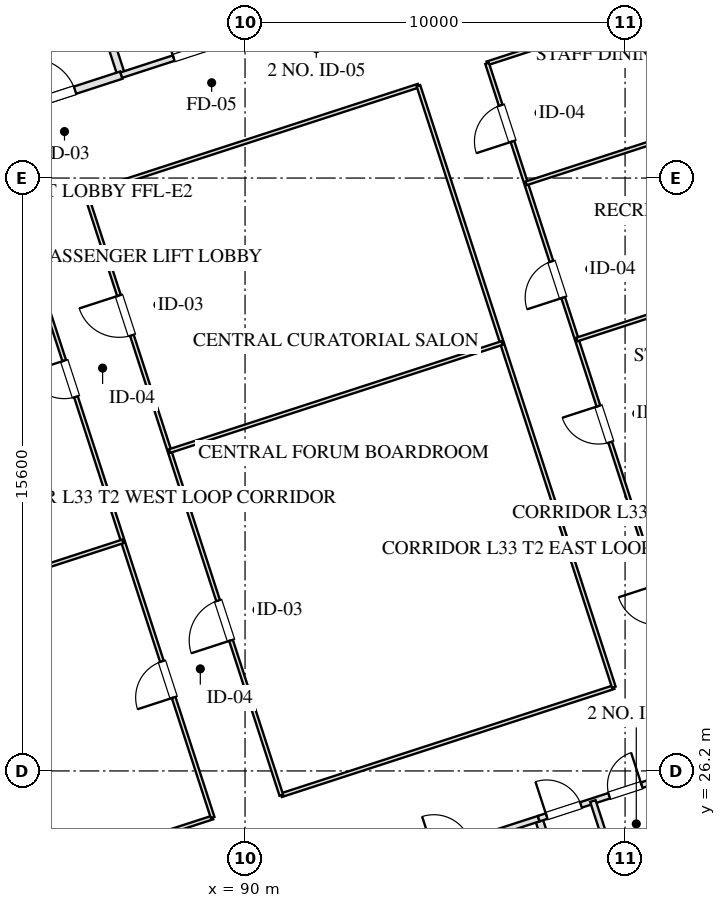
"""IFC4 building model, lengths in metres.
Left out: names, types, materials, properties, quantities, classifications, styles, units other than length and angle.
Written with IfcOpenShell. Run it as: python <this file> out.ifc"""

import sys

from ifc_helpers import new_model, si_unit, direction, frame, frame_2d, origin, place, context, subcontext, project, spatial, rectangle, extrude, element, fill, save


model = new_model("IFC4")
c1 = context("Model", 3, precision=1e-05, world=origin(), true_north=direction((0.0, 1.0)))
c2 = subcontext(c1, "Body", "Model", "MODEL_VIEW")
j1 = project(units=[si_unit("LENGTHUNIT", "METRE"), si_unit("PLANEANGLEUNIT", "RADIAN")], contexts=[c1])
p1 = place(None, origin())
s1 = spatial("IfcSite", under=j1, at=p1, CompositionType="ELEMENT")
p2 = place(p1, origin())
s2 = spatial("IfcBuilding", under=s1, at=p2, CompositionType="ELEMENT")
p3 = place(p2, frame((0.0, 0.0, 127.65)))
s3 = spatial("IfcBuildingStorey", under=s2, at=p3, CompositionType="ELEMENT", Elevation=127.65)
p4 = place(p3, frame((99.284, 61.41, 0.0), z_axis=(0.0, 0.0, 1.0), x_axis=(0.309017542002, -0.95105633836, 0.0)))
e1 = element("IfcWall", 1, at=p4, inside=s3, PredefinedType="SOLIDWALL", context=c2, shape_type="SweptSolid", body=[
    extrude(rectangle(XDim=46.4, YDim=0.4, at=frame_2d((23.2, 0.0))), origin(), (0.0, 0.0, 1.0), 2.61),
])
p5 = place(p3, frame((97.727, 24.944, 0.0), z_axis=(0.0, 0.0, 1.0), x_axis=(0.309016001439, -0.951056838919, 0.0)))
e2 = element("IfcWall", 2, at=p5, inside=s3, PredefinedType="PARTITIONING", context=c2, shape_type="SweptSolid", body=[
    extrude(rectangle(XDim=8.43, YDim=0.2, at=frame_2d((4.215, 0.0))), origin(), (0.0, 0.0, 1.0), 3.175),
])
p6 = place(p3, frame((93.542, 23.585, 0.0), z_axis=(0.0, 0.0, 1.0), x_axis=(0.951063829732, 0.308994485023, 0.0)))
e3 = element("IfcWall", 3, at=p6, inside=s3, PredefinedType="PARTITIONING", context=c2, shape_type="SweptSolid", body=[
    extrude(rectangle(XDim=4.4, YDim=0.15, at=frame_2d((2.2, 0.0))), origin(), (0.0, 0.0, 1.0), 3.175),
])
p7 = place(p6, frame((1.5, 0.0, 0.0)))
e4 = element("IfcOpeningElement", 4, at=p7, cuts=e3, PredefinedType="OPENING", context=c2, shape_type="SweptSolid", body=[
    extrude(rectangle(XDim=1.0, YDim=2.05, at=frame_2d((0.5, 1.025))), frame((0.0, 0.085, 0.0), z_axis=(0.0, -1.0, 0.0), x_axis=(1.0, 0.0, 0.0)), (0.0, 0.0, 1.0), 0.17),
])
p8 = place(p3, frame((97.727, 24.944, 0.0), z_axis=(0.0, 0.0, 1.0), x_axis=(0.951036872128, 0.309077446369, 0.0)))
e5 = element("IfcWall", 5, at=p8, inside=s3, PredefinedType="PARTITIONING", context=c2, shape_type="SweptSolid", body=[
    extrude(rectangle(XDim=3.2, YDim=0.15, at=frame_2d((1.6, 0.0))), origin(), (0.0, 0.0, 1.0), 3.175),
])
p9 = place(p8, frame((0.22, 0.0, 0.0)))
e6 = element("IfcOpeningElement", 6, at=p9, cuts=e5, PredefinedType="OPENING", context=c2, shape_type="SweptSolid", body=[
    extrude(rectangle(XDim=0.95, YDim=2.05, at=frame_2d((0.475, 1.025))), frame((0.0, 0.085, 0.0), z_axis=(0.0, -1.0, 0.0), x_axis=(1.0, 0.0, 0.0)), (0.0, 0.0, 1.0), 0.17),
])
p10 = place(p8, frame((1.95, 0.0, 0.0)))
e7 = element("IfcOpeningElement", 7, at=p10, cuts=e5, PredefinedType="OPENING", context=c2, shape_type="SweptSolid", body=[
    extrude(rectangle(XDim=0.9, YDim=2.05, at=frame_2d((0.45, 1.025))), frame((0.0, 0.085, 0.0), z_axis=(0.0, -1.0, 0.0), x_axis=(1.0, 0.0, 0.0)), (0.0, 0.0, 1.0), 0.17),
])
p11 = place(p3, frame((99.153, 25.408, 0.0), z_axis=(0.0, 0.0, 1.0), x_axis=(0.309016001439, -0.951056838919, 0.0)))
e8 = element("IfcWall", 8, at=p11, inside=s3, PredefinedType="PARTITIONING", context=c2, shape_type="SweptSolid", body=[
    extrude(rectangle(XDim=8.43, YDim=0.15, at=frame_2d((4.215, 0.0))), origin(), (0.0, 0.0, 1.0), 3.175),
])
p12 = place(p11, frame((2.55, 0.0, 0.0)))
e9 = element("IfcOpeningElement", 9, at=p12, cuts=e8, PredefinedType="OPENING", context=c2, shape_type="SweptSolid", body=[
    extrude(rectangle(XDim=0.95, YDim=2.05, at=frame_2d((0.475, 1.025))), frame((0.0, 0.085, 0.0), z_axis=(0.0, -1.0, 0.0), x_axis=(1.0, 0.0, 0.0)), (0.0, 0.0, 1.0), 0.17),
])
p13 = place(p11, frame((5.6, 0.0, 0.0)))
e10 = element("IfcOpeningElement", 10, at=p13, cuts=e8, PredefinedType="OPENING", context=c2, shape_type="SweptSolid", body=[
    extrude(rectangle(XDim=0.9, YDim=2.05, at=frame_2d((0.45, 1.025))), frame((0.0, 0.085, 0.0), z_axis=(0.0, -1.0, 0.0), x_axis=(1.0, 0.0, 0.0)), (0.0, 0.0, 1.0), 0.17),
])
p14 = place(p3, frame((86.743, 44.508, 0.0), z_axis=(0.0, 0.0, 1.0), x_axis=(-0.309016001439, 0.951056838919, 0.0)))
e11 = element("IfcWall", 11, at=p14, inside=s3, PredefinedType="PARTITIONING", context=c2, shape_type="SweptSolid", body=[
    extrude(rectangle(XDim=8.43, YDim=0.2, at=frame_2d((4.215, 0.0))), origin(), (0.0, 0.0, 1.0), 3.175),
])
p15 = place(p3, frame((83.101, 43.324, 0.0), z_axis=(0.0, 0.0, 1.0), x_axis=(0.951052804469, 0.309028417967, 0.0)))
e12 = element("IfcWall", 12, at=p15, inside=s3, PredefinedType="PARTITIONING", context=c2, shape_type="SweptSolid", body=[
    extrude(rectangle(XDim=3.83, YDim=0.2, at=frame_2d((1.915, 0.0))), origin(), (0.0, 0.0, 1.0), 3.175),
])
p16 = place(p15, frame((1.35, 0.0, 0.0)))
e13 = element("IfcOpeningElement", 13, at=p16, cuts=e12, PredefinedType="OPENING", context=c2, shape_type="SweptSolid", body=[
    extrude(rectangle(XDim=1.2, YDim=2.05, at=frame_2d((0.6, 1.025))), frame((0.0, 0.11, 0.0), z_axis=(0.0, -1.0, 0.0), x_axis=(1.0, 0.0, 0.0)), (0.0, 0.0, 1.0), 0.22),
])
p17 = place(p3, frame((86.743, 44.508, 0.0), z_axis=(0.0, 0.0, 1.0), x_axis=(0.951063829732, 0.308994485023, 0.0)))
e14 = element("IfcWall", 14, at=p17, inside=s3, PredefinedType="PARTITIONING", context=c2, shape_type="SweptSolid", body=[
    extrude(rectangle(XDim=4.4, YDim=0.15, at=frame_2d((2.2, 0.0))), origin(), (0.0, 0.0, 1.0), 3.175),
])
p18 = place(p17, frame((1.45, 0.0, 0.0)))
e15 = element("IfcOpeningElement", 15, at=p18, cuts=e14, PredefinedType="OPENING", context=c2, shape_type="SweptSolid", body=[
    extrude(rectangle(XDim=1.5, YDim=2.05, at=frame_2d((0.75, 1.025))), frame((0.0, 0.085, 0.0), z_axis=(0.0, -1.0, 0.0), x_axis=(1.0, 0.0, 0.0)), (0.0, 0.0, 1.0), 0.17),
])
p19 = place(p3, frame((76.308, 20.803, 0.0), z_axis=(0.0, 0.0, 1.0), x_axis=(0.951054001411, 0.309024734286, 0.0)))
e16 = element("IfcWall", 16, at=p19, inside=s3, PredefinedType="MOVABLE", context=c2, shape_type="SweptSolid", body=[
    extrude(rectangle(XDim=13.5, YDim=0.1, at=frame_2d((6.75, 0.0))), origin(), (0.0, 0.0, 1.0), 3.175),
])
p20 = place(p3, frame((90.954, 25.562, 0.0), z_axis=(0.0, 0.0, 1.0), x_axis=(0.951052398814, 0.309029666393, 0.0)))
e17 = element("IfcWall", 17, at=p20, inside=s3, PredefinedType="MOVABLE", context=c2, shape_type="SweptSolid", body=[
    extrude(rectangle(XDim=9.2, YDim=0.1, at=frame_2d((4.6, 0.0))), origin(), (0.0, 0.0, 1.0), 3.175),
])
p21 = place(p3, frame((85.812, 41.387, 0.0), z_axis=(0.0, 0.0, 1.0), x_axis=(0.951054933035, 0.309021867106, 0.0)))
e18 = element("IfcWall", 18, at=p21, inside=s3, PredefinedType="MOVABLE", context=c2, shape_type="SweptSolid", body=[
    extrude(rectangle(XDim=9.2, YDim=0.1, at=frame_2d((4.6, 0.0))), origin(), (0.0, 0.0, 1.0), 3.175),
])
p22 = place(p3, frame((96.369, 44.818, 0.0), z_axis=(0.0, 0.0, 1.0), x_axis=(0.9510592298, 0.30900864294, 0.0)))
e19 = element("IfcWall", 19, at=p22, inside=s3, PredefinedType="MOVABLE", context=c2, shape_type="SweptSolid", body=[
    extrude(rectangle(XDim=7.7, YDim=0.1, at=frame_2d((3.85, 0.0))), origin(), (0.0, 0.0, 1.0), 3.175),
])
p23 = place(p3, frame((89.147, 24.975, 0.0), z_axis=(0.0, 0.0, 1.0), x_axis=(-0.309022042254, 0.951054876125, 0.0)))
e20 = element("IfcWall", 20, at=p23, inside=s3, PredefinedType="MOVABLE", context=c2, shape_type="SweptSolid", body=[
    extrude(rectangle(XDim=16.64, YDim=0.1, at=frame_2d((8.32, 0.0))), origin(), (0.0, 0.0, 1.0), 3.175),
])
p24 = place(p23, frame((3.32, 0.0, 0.0)))
e21 = element("IfcOpeningElement", 21, at=p24, cuts=e20, PredefinedType="OPENING", context=c2, shape_type="SweptSolid", body=[
    extrude(rectangle(XDim=1.0, YDim=2.05, at=frame_2d((0.5, 1.025))), frame((0.0, 0.06, 0.0), z_axis=(0.0, -1.0, 0.0), x_axis=(1.0, 0.0, 0.0)), (0.0, 0.0, 1.0), 0.12),
])
p25 = place(p23, frame((11.64, 0.0, 0.0)))
e22 = element("IfcOpeningElement", 22, at=p25, cuts=e20, PredefinedType="OPENING", context=c2, shape_type="SweptSolid", body=[
    extrude(rectangle(XDim=1.0, YDim=2.05, at=frame_2d((0.5, 1.025))), frame((0.0, 0.06, 0.0), z_axis=(0.0, -1.0, 0.0), x_axis=(1.0, 0.0, 0.0)), (0.0, 0.0, 1.0), 0.12),
])
p26 = place(p3, frame((90.954, 25.562, 0.0), z_axis=(0.0, 0.0, 1.0), x_axis=(-0.30901773025, 0.951056277195, 0.0)))
e23 = element("IfcWall", 23, at=p26, inside=s3, PredefinedType="MOVABLE", context=c2, shape_type="SweptSolid", body=[
    extrude(rectangle(XDim=16.64, YDim=0.1, at=frame_2d((8.32, 0.0))), origin(), (0.0, 0.0, 1.0), 3.175),
])
p27 = place(p26, frame((4.284, 0.0, 0.0)))
e24 = element("IfcOpeningElement", 24, at=p27, cuts=e23, PredefinedType="OPENING", context=c2, shape_type="SweptSolid", body=[
    extrude(rectangle(XDim=1.1, YDim=2.05, at=frame_2d((0.55, 1.025))), frame((0.0, 0.06, 0.0), z_axis=(0.0, -1.0, 0.0), x_axis=(1.0, 0.0, 0.0)), (0.0, 0.0, 1.0), 0.12),
])
p28 = place(p26, frame((12.724, 0.0, 0.0)))
e25 = element("IfcOpeningElement", 25, at=p28, cuts=e23, PredefinedType="OPENING", context=c2, shape_type="SweptSolid", body=[
    extrude(rectangle(XDim=1.1, YDim=2.05, at=frame_2d((0.55, 1.025))), frame((0.0, 0.06, 0.0), z_axis=(0.0, -1.0, 0.0), x_axis=(1.0, 0.0, 0.0)), (0.0, 0.0, 1.0), 0.12),
])
p29 = place(p3, frame((99.704, 28.405, 0.0), z_axis=(0.0, 0.0, 1.0), x_axis=(-0.309004459387, 0.951060589068, 0.0)))
e26 = element("IfcWall", 26, at=p29, inside=s3, PredefinedType="MOVABLE", context=c2, shape_type="SweptSolid", body=[
    extrude(rectangle(XDim=16.64, YDim=0.1, at=frame_2d((8.32, 0.0))), origin(), (0.0, 0.0, 1.0), 3.175),
])
p30 = place(p3, frame((101.511, 28.992, 0.0), z_axis=(0.0, 0.0, 1.0), x_axis=(-0.30901773025, 0.951056277195, 0.0)))
e27 = element("IfcWall", 27, at=p30, inside=s3, PredefinedType="MOVABLE", context=c2, shape_type="SweptSolid", body=[
    extrude(rectangle(XDim=16.64, YDim=0.1, at=frame_2d((8.32, 0.0))), origin(), (0.0, 0.0, 1.0), 3.175),
])
p31 = place(p30, frame((1.16, 0.0, 0.0)))
e28 = element("IfcOpeningElement", 28, at=p31, cuts=e27, PredefinedType="OPENING", context=c2, shape_type="SweptSolid", body=[
    extrude(rectangle(XDim=1.05, YDim=2.05, at=frame_2d((0.525, 1.025))), frame((0.0, 0.06, 0.0), z_axis=(0.0, -1.0, 0.0), x_axis=(1.0, 0.0, 0.0)), (0.0, 0.0, 1.0), 0.12),
])
p32 = place(p30, frame((6.16, 0.0, 0.0)))
e29 = element("IfcOpeningElement", 29, at=p32, cuts=e27, PredefinedType="OPENING", context=c2, shape_type="SweptSolid", body=[
    extrude(rectangle(XDim=1.0, YDim=2.05, at=frame_2d((0.5, 1.025))), frame((0.0, 0.06, 0.0), z_axis=(0.0, -1.0, 0.0), x_axis=(1.0, 0.0, 0.0)), (0.0, 0.0, 1.0), 0.12),
])
p33 = place(p30, frame((10.16, 0.0, 0.0)))
e30 = element("IfcOpeningElement", 30, at=p33, cuts=e27, PredefinedType="OPENING", context=c2, shape_type="SweptSolid", body=[
    extrude(rectangle(XDim=1.0, YDim=2.05, at=frame_2d((0.5, 1.025))), frame((0.0, 0.06, 0.0), z_axis=(0.0, -1.0, 0.0), x_axis=(1.0, 0.0, 0.0)), (0.0, 0.0, 1.0), 0.12),
])
p34 = place(p30, frame((14.48, 0.0, 0.0)))
e31 = element("IfcOpeningElement", 31, at=p34, cuts=e27, PredefinedType="OPENING", context=c2, shape_type="SweptSolid", body=[
    extrude(rectangle(XDim=1.0, YDim=2.05, at=frame_2d((0.5, 1.025))), frame((0.0, 0.06, 0.0), z_axis=(0.0, -1.0, 0.0), x_axis=(1.0, 0.0, 0.0)), (0.0, 0.0, 1.0), 0.12),
])
p35 = place(p3, frame((88.012, 34.616, 0.0), z_axis=(0.0, 0.0, 1.0), x_axis=(0.951054933035, 0.309021867106, 0.0)))
e32 = element("IfcWall", 32, at=p35, inside=s3, PredefinedType="MOVABLE", context=c2, shape_type="SweptSolid", body=[
    extrude(rectangle(XDim=9.2, YDim=0.1, at=frame_2d((4.6, 0.0))), origin(), (0.0, 0.0, 1.0), 3.175),
])
p36 = place(p3, frame((73.947, 28.069, 0.0), z_axis=(0.0, 0.0, 1.0), x_axis=(0.951059316265, 0.309008376821, 0.0)))
e33 = element("IfcWall", 33, at=p36, inside=s3, PredefinedType="MOVABLE", context=c2, shape_type="SweptSolid", body=[
    extrude(rectangle(XDim=13.5, YDim=0.1, at=frame_2d((6.75, 0.0))), origin(), (0.0, 0.0, 1.0), 3.175),
])
p37 = place(p3, frame((100.176, 33.101, 0.0), z_axis=(0.0, 0.0, 1.0), x_axis=(0.951056202154, 0.3090179612, 0.0)))
e34 = element("IfcWall", 34, at=p37, inside=s3, PredefinedType="MOVABLE", context=c2, shape_type="SweptSolid", body=[
    extrude(rectangle(XDim=7.7, YDim=0.1, at=frame_2d((3.85, 0.0))), origin(), (0.0, 0.0, 1.0), 3.175),
])
for number, where, z_axis, x_axis in (
    (35, (98.73, 37.552, 0.0), (0.0, 0.0, 1.0), (0.951, 0.309, 0.0)),
    (36, (97.395, 41.66, 0.0), (0.0, 0.0, 1.0), (0.951, 0.309, 0.0)),
):
    element("IfcWall", number, at=place(p3, frame(where, z_axis=z_axis, x_axis=x_axis)), inside=s3, PredefinedType="MOVABLE", context=c2, shape_type="SweptSolid", body=[
        extrude(rectangle(XDim=7.7, YDim=0.1, at=frame_2d((3.85, 0.0))), origin(), (0.0, 0.0, 1.0), 3.175),
    ])
p38 = place(p9, origin())
e37 = element("IfcDoor", 37, at=p38, inside=s3, OperationType="SINGLE_SWING_LEFT", PredefinedType="DOOR", context=c2, shape_type="SweptSolid", body=[
    extrude(rectangle(XDim=0.95, YDim=2.05, at=frame_2d((0.475, 1.025))), frame((0.0, 0.025, 0.0), z_axis=(0.0, -1.0, 0.0), x_axis=(1.0, 0.0, 0.0)), (0.0, 0.0, 1.0), 0.05),
])
fill(e6, e37)
p39 = place(p10, origin())
e38 = element("IfcDoor", 38, at=p39, inside=s3, OperationType="SINGLE_SWING_RIGHT", PredefinedType="DOOR", context=c2, shape_type="SweptSolid", body=[
    extrude(rectangle(XDim=0.9, YDim=2.05, at=frame_2d((0.45, 1.025))), frame((0.0, 0.025, 0.0), z_axis=(0.0, -1.0, 0.0), x_axis=(1.0, 0.0, 0.0)), (0.0, 0.0, 1.0), 0.05),
])
fill(e7, e38)
p40 = place(p16, origin())
e39 = element("IfcDoor", 39, at=p40, inside=s3, OperationType="SINGLE_SWING_LEFT", PredefinedType="DOOR", context=c2, shape_type="SweptSolid", body=[
    extrude(rectangle(XDim=1.2, YDim=2.05, at=frame_2d((0.6, 1.025))), frame((0.0, 0.025, 0.0), z_axis=(0.0, -1.0, 0.0), x_axis=(1.0, 0.0, 0.0)), (0.0, 0.0, 1.0), 0.05),
])
fill(e13, e39)
p41 = place(p18, origin())
e40 = element("IfcDoor", 40, at=p41, inside=s3, OperationType="SINGLE_SWING_LEFT", PredefinedType="DOOR", context=c2, shape_type="SweptSolid", body=[
    extrude(rectangle(XDim=1.5, YDim=2.05, at=frame_2d((0.75, 1.025))), frame((0.0, 0.025, 0.0), z_axis=(0.0, -1.0, 0.0), x_axis=(1.0, 0.0, 0.0)), (0.0, 0.0, 1.0), 0.05),
])
fill(e15, e40)
p42 = place(p24, origin())
e41 = element("IfcDoor", 41, at=p42, inside=s3, OperationType="SINGLE_SWING_LEFT", PredefinedType="DOOR", context=c2, shape_type="SweptSolid", body=[
    extrude(rectangle(XDim=1.0, YDim=2.05, at=frame_2d((0.5, 1.025))), frame((0.0, 0.025, 0.0), z_axis=(0.0, -1.0, 0.0), x_axis=(1.0, 0.0, 0.0)), (0.0, 0.0, 1.0), 0.05),
])
fill(e21, e41)
p43 = place(p25, origin())
e42 = element("IfcDoor", 42, at=p43, inside=s3, OperationType="SINGLE_SWING_RIGHT", PredefinedType="DOOR", context=c2, shape_type="SweptSolid", body=[
    extrude(rectangle(XDim=1.0, YDim=2.05, at=frame_2d((0.5, 1.025))), frame((0.0, 0.025, 0.0), z_axis=(0.0, -1.0, 0.0), x_axis=(1.0, 0.0, 0.0)), (0.0, 0.0, 1.0), 0.05),
])
fill(e22, e42)
p44 = place(p27, origin())
e43 = element("IfcDoor", 43, at=p44, inside=s3, OperationType="SINGLE_SWING_LEFT", PredefinedType="DOOR", context=c2, shape_type="SweptSolid", body=[
    extrude(rectangle(XDim=1.1, YDim=2.05, at=frame_2d((0.55, 1.025))), frame((0.0, 0.025, 0.0), z_axis=(0.0, -1.0, 0.0), x_axis=(1.0, 0.0, 0.0)), (0.0, 0.0, 1.0), 0.05),
])
fill(e24, e43)
p45 = place(p28, origin())
e44 = element("IfcDoor", 44, at=p45, inside=s3, OperationType="SINGLE_SWING_RIGHT", PredefinedType="DOOR", context=c2, shape_type="SweptSolid", body=[
    extrude(rectangle(XDim=1.1, YDim=2.05, at=frame_2d((0.55, 1.025))), frame((0.0, 0.025, 0.0), z_axis=(0.0, -1.0, 0.0), x_axis=(1.0, 0.0, 0.0)), (0.0, 0.0, 1.0), 0.05),
])
fill(e25, e44)
p46 = place(p32, origin())
e45 = element("IfcDoor", 45, at=p46, inside=s3, OperationType="SINGLE_SWING_RIGHT", PredefinedType="DOOR", context=c2, shape_type="SweptSolid", body=[
    extrude(rectangle(XDim=1.0, YDim=2.05, at=frame_2d((0.5, 1.025))), frame((0.0, 0.025, 0.0), z_axis=(0.0, -1.0, 0.0), x_axis=(1.0, 0.0, 0.0)), (0.0, 0.0, 1.0), 0.05),
])
fill(e29, e45)
p47 = place(p33, origin())
e46 = element("IfcDoor", 46, at=p47, inside=s3, OperationType="SINGLE_SWING_LEFT", PredefinedType="DOOR", context=c2, shape_type="SweptSolid", body=[
    extrude(rectangle(XDim=1.0, YDim=2.05, at=frame_2d((0.5, 1.025))), frame((0.0, 0.025, 0.0), z_axis=(0.0, -1.0, 0.0), x_axis=(1.0, 0.0, 0.0)), (0.0, 0.0, 1.0), 0.05),
])
fill(e30, e46)
p48 = place(p34, origin())
e47 = element("IfcDoor", 47, at=p48, inside=s3, OperationType="SINGLE_SWING_LEFT", PredefinedType="DOOR", context=c2, shape_type="SweptSolid", body=[
    extrude(rectangle(XDim=1.0, YDim=2.05, at=frame_2d((0.5, 1.025))), frame((0.0, 0.025, 0.0), z_axis=(0.0, -1.0, 0.0), x_axis=(1.0, 0.0, 0.0)), (0.0, 0.0, 1.0), 0.05),
])
fill(e31, e47)
save(model, sys.argv[1])
